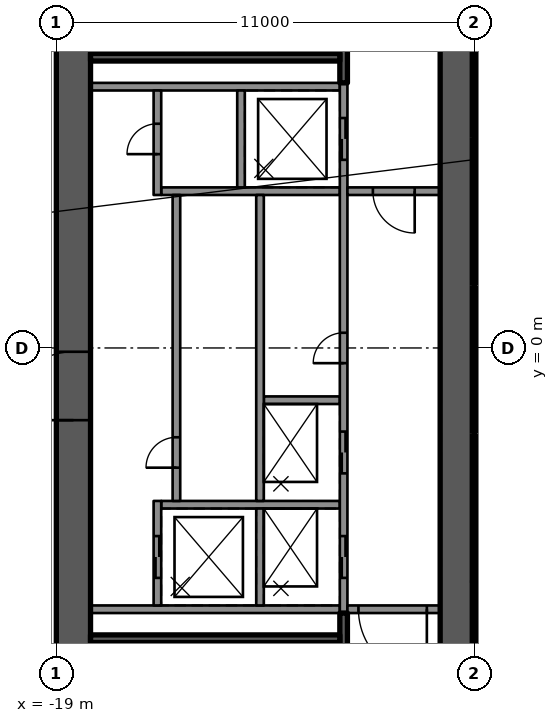
"""IFC4 building model, lengths in metres.
Left out: names, types, materials, properties, quantities, classifications, styles, units other than length and angle.
Written with IfcOpenShell. Run it as: python <this file> out.ifc"""

import sys

from ifc_helpers import new_model, si_unit, direction, frame, frame_2d, origin, place, context, subcontext, project, spatial, rectangle, extrude, element, fill, save


model = new_model("IFC4")
c1 = context("Model", 3, precision=1e-05, world=origin(), true_north=direction((0.0, 1.0)))
c2 = subcontext(c1, "Body", "Model", "MODEL_VIEW")
j1 = project(units=[si_unit("LENGTHUNIT", "METRE"), si_unit("PLANEANGLEUNIT", "RADIAN")], contexts=[c1])
p1 = place(None, origin())
s1 = spatial("IfcSite", under=j1, at=p1, CompositionType="ELEMENT")
p2 = place(p1, origin())
s2 = spatial("IfcBuilding", under=s1, at=p2, CompositionType="ELEMENT")
p3 = place(p2, frame((0.0, 0.0, 253.5)))
s3 = spatial("IfcBuildingStorey", under=s2, at=p3, CompositionType="ELEMENT", Elevation=253.5)
p4 = place(p3, frame((-18.55, -12.0, 0.0), z_axis=(0.0, 0.0, 1.0), x_axis=(0.0, 1.0, 0.0)))
e1 = element("IfcWall", 1, at=p4, inside=s3, PredefinedType="SHEAR", context=c2, shape_type="SweptSolid", body=[
    extrude(rectangle(XDim=24.0, YDim=0.9, at=frame_2d((12.0, 0.0))), origin(), (0.0, 0.0, 1.0), 3.5),
])
p5 = place(p4, frame((10.1, 0.0, 0.0)))
e2 = element("IfcOpeningElement", 2, at=p5, cuts=e1, PredefinedType="OPENING", context=c2, shape_type="SweptSolid", body=[
    extrude(rectangle(XDim=1.8, YDim=2.1, at=frame_2d((0.9, 1.05))), frame((0.0, 0.46, 0.0), z_axis=(0.0, -1.0, 0.0), x_axis=(1.0, 0.0, 0.0)), (0.0, 0.0, 1.0), 0.92),
])
p6 = place(p3, frame((-8.45, -12.0, 0.0), z_axis=(0.0, 0.0, 1.0), x_axis=(0.0, 1.0, 0.0)))
e3 = element("IfcWall", 3, at=p6, inside=s3, PredefinedType="SHEAR", context=c2, shape_type="SweptSolid", body=[
    extrude(rectangle(XDim=24.0, YDim=0.9, at=frame_2d((12.0, 0.0))), origin(), (0.0, 0.0, 1.0), 3.5),
])
for number, where, z_axis, x_axis in (
    (4, (-11.54, 6.875, 0.0), (0.0, 0.0, 1.0), (-1.0, 0.0, 0.0)),
    (5, (-11.54, -6.875, 0.0), (0.0, 0.0, 1.0), (-1.0, 0.0, 0.0)),
):
    element("IfcWall", number, at=place(p3, frame(where, z_axis=z_axis, x_axis=x_axis)), inside=s3, PredefinedType="SOLIDWALL", context=c2, shape_type="SweptSolid", body=[
        extrude(rectangle(XDim=6.56, YDim=0.2, at=frame_2d((3.28, 0.0))), origin(), (0.0, 0.0, 1.0), 3.09),
    ])
p7 = place(p3, frame((-11.54, -4.125, 0.0), z_axis=(0.0, 0.0, 1.0), x_axis=(-1.0, 0.0, 0.0)))
e6 = element("IfcWall", 6, at=p7, inside=s3, PredefinedType="SOLIDWALL", context=c2, shape_type="SweptSolid", body=[
    extrude(rectangle(XDim=4.7, YDim=0.2, at=frame_2d((2.35, 0.0))), origin(), (0.0, 0.0, 1.0), 3.09),
])
p8 = place(p3, frame((-11.54, -1.375, 0.0), z_axis=(0.0, 0.0, 1.0), x_axis=(-1.0, 0.0, 0.0)))
e7 = element("IfcWall", 7, at=p8, inside=s3, PredefinedType="SOLIDWALL", context=c2, shape_type="SweptSolid", body=[
    extrude(rectangle(XDim=2.0, YDim=0.2, at=frame_2d((1.0, 0.0))), origin(), (0.0, 0.0, 1.0), 3.09),
])
p9 = place(p3, frame((-11.54, 4.125, 0.0), z_axis=(0.0, 0.0, 1.0), x_axis=(-1.0, 0.0, 0.0)))
e8 = element("IfcWall", 8, at=p9, inside=s3, PredefinedType="SOLIDWALL", context=c2, shape_type="SweptSolid", body=[
    extrude(rectangle(XDim=4.7, YDim=0.2, at=frame_2d((2.35, 0.0))), origin(), (0.0, 0.0, 1.0), 3.09),
])
p10 = place(p3, frame((-11.44, -6.975, 0.0), z_axis=(0.0, 0.0, 1.0), x_axis=(0.0, 1.0, 0.0)))
e9 = element("IfcWall", 9, at=p10, inside=s3, PredefinedType="SOLIDWALL", context=c2, shape_type="SweptSolid", body=[
    extrude(rectangle(XDim=13.95, YDim=0.2, at=frame_2d((6.975, 0.0))), origin(), (0.0, 0.0, 1.0), 3.09),
])
p11 = place(p10, frame((0.925, 0.0, 0.0)))
e10 = element("IfcOpeningElement", 10, at=p11, cuts=e9, PredefinedType="OPENING", context=c2, shape_type="SweptSolid", body=[
    extrude(rectangle(XDim=1.1, YDim=2.1, at=frame_2d((0.55, 1.05))), frame((0.0, 0.11, 0.0), z_axis=(0.0, -1.0, 0.0), x_axis=(1.0, 0.0, 0.0)), (0.0, 0.0, 1.0), 0.22),
])
p12 = place(p10, frame((3.675, 0.0, 0.0)))
e11 = element("IfcOpeningElement", 11, at=p12, cuts=e9, PredefinedType="OPENING", context=c2, shape_type="SweptSolid", body=[
    extrude(rectangle(XDim=1.1, YDim=2.1, at=frame_2d((0.55, 1.05))), frame((0.0, 0.11, 0.0), z_axis=(0.0, -1.0, 0.0), x_axis=(1.0, 0.0, 0.0)), (0.0, 0.0, 1.0), 0.22),
])
p13 = place(p10, frame((11.925, 0.0, 0.0)))
e12 = element("IfcOpeningElement", 12, at=p13, cuts=e9, PredefinedType="OPENING", context=c2, shape_type="SweptSolid", body=[
    extrude(rectangle(XDim=1.1, YDim=2.1, at=frame_2d((0.55, 1.05))), frame((0.0, 0.11, 0.0), z_axis=(0.0, -1.0, 0.0), x_axis=(1.0, 0.0, 0.0)), (0.0, 0.0, 1.0), 0.22),
])
p14 = place(p10, frame((6.575, 0.0, 0.0)))
e13 = element("IfcOpeningElement", 13, at=p14, cuts=e9, PredefinedType="OPENING", context=c2, shape_type="SweptSolid", body=[
    extrude(rectangle(XDim=0.8, YDim=2.1, at=frame_2d((0.4, 1.05))), frame((0.0, 0.11, 0.0), z_axis=(0.0, -1.0, 0.0), x_axis=(1.0, 0.0, 0.0)), (0.0, 0.0, 1.0), 0.22),
])
p15 = place(p3, frame((-13.64, -6.775, 0.0), z_axis=(0.0, 0.0, 1.0), x_axis=(0.0, 1.0, 0.0)))
e14 = element("IfcWall", 14, at=p15, inside=s3, PredefinedType="SOLIDWALL", context=c2, shape_type="SweptSolid", body=[
    extrude(rectangle(XDim=2.55, YDim=0.2, at=frame_2d((1.275, 0.0))), origin(), (0.0, 0.0, 1.0), 3.09),
])
p16 = place(p3, frame((-13.64, -4.025, 0.0), z_axis=(0.0, 0.0, 1.0), x_axis=(0.0, 1.0, 0.0)))
e15 = element("IfcWall", 15, at=p16, inside=s3, PredefinedType="SOLIDWALL", context=c2, shape_type="SweptSolid", body=[
    extrude(rectangle(XDim=8.05, YDim=0.2, at=frame_2d((4.025, 0.0))), origin(), (0.0, 0.0, 1.0), 3.09),
])
p17 = place(p3, frame((-14.14, 4.225, 0.0), z_axis=(0.0, 0.0, 1.0), x_axis=(0.0, 1.0, 0.0)))
e16 = element("IfcWall", 16, at=p17, inside=s3, PredefinedType="SOLIDWALL", context=c2, shape_type="SweptSolid", body=[
    extrude(rectangle(XDim=2.55, YDim=0.2, at=frame_2d((1.275, 0.0))), origin(), (0.0, 0.0, 1.0), 3.09),
])
p18 = place(p3, frame((-16.34, -6.775, 0.0), z_axis=(0.0, 0.0, 1.0), x_axis=(0.0, 1.0, 0.0)))
e17 = element("IfcWall", 17, at=p18, inside=s3, PredefinedType="SOLIDWALL", context=c2, shape_type="SweptSolid", body=[
    extrude(rectangle(XDim=2.75, YDim=0.2, at=frame_2d((1.375, 0.0))), origin(), (0.0, 0.0, 1.0), 3.09),
])
p19 = place(p18, frame((0.725, 0.0, 0.0)))
e18 = element("IfcOpeningElement", 18, at=p19, cuts=e17, PredefinedType="OPENING", context=c2, shape_type="SweptSolid", body=[
    extrude(rectangle(XDim=1.1, YDim=2.1, at=frame_2d((0.55, 1.05))), frame((0.0, 0.11, 0.0), z_axis=(0.0, -1.0, 0.0), x_axis=(1.0, 0.0, 0.0)), (0.0, 0.0, 1.0), 0.22),
])
p20 = place(p3, frame((-15.84, -4.025, 0.0), z_axis=(0.0, 0.0, 1.0), x_axis=(0.0, 1.0, 0.0)))
e19 = element("IfcWall", 19, at=p20, inside=s3, PredefinedType="SOLIDWALL", context=c2, shape_type="SweptSolid", body=[
    extrude(rectangle(XDim=8.05, YDim=0.2, at=frame_2d((4.025, 0.0))), origin(), (0.0, 0.0, 1.0), 3.09),
])
p21 = place(p20, frame((0.875, 0.0, 0.0)))
e20 = element("IfcOpeningElement", 20, at=p21, cuts=e19, PredefinedType="OPENING", context=c2, shape_type="SweptSolid", body=[
    extrude(rectangle(XDim=0.8, YDim=2.1, at=frame_2d((0.4, 1.05))), frame((0.0, 0.11, 0.0), z_axis=(0.0, -1.0, 0.0), x_axis=(1.0, 0.0, 0.0)), (0.0, 0.0, 1.0), 0.22),
])
p22 = place(p3, frame((-16.34, 4.025, 0.0), z_axis=(0.0, 0.0, 1.0), x_axis=(0.0, 1.0, 0.0)))
e21 = element("IfcWall", 21, at=p22, inside=s3, PredefinedType="SOLIDWALL", context=c2, shape_type="SweptSolid", body=[
    extrude(rectangle(XDim=2.75, YDim=0.2, at=frame_2d((1.375, 0.0))), origin(), (0.0, 0.0, 1.0), 3.09),
])
p23 = place(p22, frame((1.075, 0.0, 0.0)))
e22 = element("IfcOpeningElement", 22, at=p23, cuts=e21, PredefinedType="OPENING", context=c2, shape_type="SweptSolid", body=[
    extrude(rectangle(XDim=0.8, YDim=2.1, at=frame_2d((0.4, 1.05))), frame((0.0, 0.11, 0.0), z_axis=(0.0, -1.0, 0.0), x_axis=(1.0, 0.0, 0.0)), (0.0, 0.0, 1.0), 0.22),
])
p24 = place(p3, frame((-11.44, 6.975, 0.0), z_axis=(0.0, 0.0, 1.0), x_axis=(0.0, 1.0, 0.0)))
e23 = element("IfcWall", 23, at=p24, inside=s3, PredefinedType="SOLIDWALL", context=c2, shape_type="SweptSolid", body=[
    extrude(rectangle(XDim=4.125, YDim=0.2, at=frame_2d((2.062, 0.0))), origin(), (0.0, 0.0, 1.0), 3.09),
])
p25 = place(p24, frame((2.1, 0.0, 0.0)))
e24 = element("IfcOpeningElement", 24, at=p25, cuts=e23, PredefinedType="OPENING", context=c2, shape_type="SweptSolid", body=[
    extrude(rectangle(XDim=1.1, YDim=2.1, at=frame_2d((0.55, 1.05))), frame((0.0, 0.11, 0.0), z_axis=(0.0, -1.0, 0.0), x_axis=(1.0, 0.0, 0.0)), (0.0, 0.0, 1.0), 0.22),
])
p26 = place(p3, frame((-11.54, 7.65, 0.0), z_axis=(0.0, 0.0, 1.0), x_axis=(-1.0, 0.0, 0.0)))
e25 = element("IfcWall", 25, at=p26, inside=s3, PredefinedType="SOLIDWALL", context=c2, shape_type="SweptSolid", body=[
    extrude(rectangle(XDim=6.56, YDim=0.2, at=frame_2d((3.28, 0.0))), origin(), (0.0, 0.0, 1.0), 3.09),
])
p27 = place(p3, frame((-11.44, -11.1, 0.0), z_axis=(0.0, 0.0, 1.0), x_axis=(0.0, 1.0, 0.0)))
e26 = element("IfcWall", 26, at=p27, inside=s3, PredefinedType="SOLIDWALL", context=c2, shape_type="SweptSolid", body=[
    extrude(rectangle(XDim=4.125, YDim=0.2, at=frame_2d((2.062, 0.0))), origin(), (0.0, 0.0, 1.0), 3.09),
])
p28 = place(p3, frame((-11.54, -7.65, 0.0), z_axis=(0.0, 0.0, 1.0), x_axis=(-1.0, 0.0, 0.0)))
e27 = element("IfcWall", 27, at=p28, inside=s3, PredefinedType="SOLIDWALL", context=c2, shape_type="SweptSolid", body=[
    extrude(rectangle(XDim=6.56, YDim=0.2, at=frame_2d((3.28, 0.0))), origin(), (0.0, 0.0, 1.0), 3.09),
])
p29 = place(p3, frame((-8.9, 4.125, 0.0), z_axis=(0.0, 0.0, 1.0), x_axis=(-1.0, 0.0, 0.0)))
e28 = element("IfcWall", 28, at=p29, inside=s3, PredefinedType="PARTITIONING", context=c2, shape_type="SweptSolid", body=[
    extrude(rectangle(XDim=2.44, YDim=0.2, at=frame_2d((1.22, 0.0))), origin(), (0.0, 0.0, 1.0), 3.09),
])
p30 = place(p29, frame((0.67, 0.0, 0.0)))
e29 = element("IfcOpeningElement", 29, at=p30, cuts=e28, PredefinedType="OPENING", context=c2, shape_type="SweptSolid", body=[
    extrude(rectangle(XDim=1.1, YDim=2.1, at=frame_2d((0.55, 1.05))), frame((0.0, 0.11, 0.0), z_axis=(0.0, -1.0, 0.0), x_axis=(1.0, 0.0, 0.0)), (0.0, 0.0, 1.0), 0.22),
])
p31 = place(p3, frame((-8.9, -6.875, 0.0), z_axis=(0.0, 0.0, 1.0), x_axis=(-1.0, 0.0, 0.0)))
e30 = element("IfcWall", 30, at=p31, inside=s3, PredefinedType="PARTITIONING", context=c2, shape_type="SweptSolid", body=[
    extrude(rectangle(XDim=2.44, YDim=0.2, at=frame_2d((1.22, 0.0))), origin(), (0.0, 0.0, 1.0), 3.09),
])
p32 = place(p31, frame((0.35, 0.0, 0.0)))
e31 = element("IfcOpeningElement", 31, at=p32, cuts=e30, PredefinedType="OPENING", context=c2, shape_type="SweptSolid", body=[
    extrude(rectangle(XDim=1.8, YDim=2.1, at=frame_2d((0.9, 1.05))), frame((0.0, 0.11, 0.0), z_axis=(0.0, -1.0, 0.0), x_axis=(1.0, 0.0, 0.0)), (0.0, 0.0, 1.0), 0.22),
])
p33 = place(p11, origin())
e32 = element("IfcDoor", 32, at=p33, inside=s3, OperationType="DOUBLE_DOOR_SLIDING", PredefinedType="DOOR", context=c2, shape_type="SweptSolid", body=[
    extrude(rectangle(XDim=1.1, YDim=2.1, at=frame_2d((0.55, 1.05))), frame((0.0, 0.025, 0.0), z_axis=(0.0, -1.0, 0.0), x_axis=(1.0, 0.0, 0.0)), (0.0, 0.0, 1.0), 0.05),
])
fill(e10, e32)
p34 = place(p19, origin())
e33 = element("IfcDoor", 33, at=p34, inside=s3, OperationType="DOUBLE_DOOR_SLIDING", PredefinedType="DOOR", context=c2, shape_type="SweptSolid", body=[
    extrude(rectangle(XDim=1.1, YDim=2.1, at=frame_2d((0.55, 1.05))), frame((0.0, 0.025, 0.0), z_axis=(0.0, -1.0, 0.0), x_axis=(1.0, 0.0, 0.0)), (0.0, 0.0, 1.0), 0.05),
])
fill(e18, e33)
p35 = place(p12, origin())
e34 = element("IfcDoor", 34, at=p35, inside=s3, OperationType="DOUBLE_DOOR_SLIDING", PredefinedType="DOOR", context=c2, shape_type="SweptSolid", body=[
    extrude(rectangle(XDim=1.1, YDim=2.1, at=frame_2d((0.55, 1.05))), frame((0.0, 0.025, 0.0), z_axis=(0.0, -1.0, 0.0), x_axis=(1.0, 0.0, 0.0)), (0.0, 0.0, 1.0), 0.05),
])
fill(e11, e34)
p36 = place(p13, origin())
e35 = element("IfcDoor", 35, at=p36, inside=s3, OperationType="DOUBLE_DOOR_SLIDING", PredefinedType="DOOR", context=c2, shape_type="SweptSolid", body=[
    extrude(rectangle(XDim=1.1, YDim=2.1, at=frame_2d((0.55, 1.05))), frame((0.0, 0.025, 0.0), z_axis=(0.0, -1.0, 0.0), x_axis=(1.0, 0.0, 0.0)), (0.0, 0.0, 1.0), 0.05),
])
fill(e12, e35)
p37 = place(p21, origin())
e36 = element("IfcDoor", 36, at=p37, inside=s3, OperationType="SINGLE_SWING_LEFT", PredefinedType="DOOR", context=c2, shape_type="SweptSolid", body=[
    extrude(rectangle(XDim=0.8, YDim=2.1, at=frame_2d((0.4, 1.05))), frame((0.0, 0.025, 0.0), z_axis=(0.0, -1.0, 0.0), x_axis=(1.0, 0.0, 0.0)), (0.0, 0.0, 1.0), 0.05),
])
fill(e20, e36)
p38 = place(p14, origin())
e37 = element("IfcDoor", 37, at=p38, inside=s3, OperationType="SINGLE_SWING_LEFT", PredefinedType="DOOR", context=c2, shape_type="SweptSolid", body=[
    extrude(rectangle(XDim=0.8, YDim=2.1, at=frame_2d((0.4, 1.05))), frame((0.0, 0.025, 0.0), z_axis=(0.0, -1.0, 0.0), x_axis=(1.0, 0.0, 0.0)), (0.0, 0.0, 1.0), 0.05),
])
fill(e13, e37)
p39 = place(p23, origin())
e38 = element("IfcDoor", 38, at=p39, inside=s3, OperationType="SINGLE_SWING_LEFT", PredefinedType="DOOR", context=c2, shape_type="SweptSolid", body=[
    extrude(rectangle(XDim=0.8, YDim=2.1, at=frame_2d((0.4, 1.05))), frame((0.0, 0.025, 0.0), z_axis=(0.0, -1.0, 0.0), x_axis=(1.0, 0.0, 0.0)), (0.0, 0.0, 1.0), 0.05),
])
fill(e22, e38)
p40 = place(p5, origin())
e39 = element("IfcDoor", 39, at=p40, inside=s3, OperationType="SINGLE_SWING_LEFT", PredefinedType="DOOR", context=c2, shape_type="SweptSolid", body=[
    extrude(rectangle(XDim=1.8, YDim=2.1, at=frame_2d((0.9, 1.05))), frame((0.0, 0.025, 0.0), z_axis=(0.0, -1.0, 0.0), x_axis=(1.0, 0.0, 0.0)), (0.0, 0.0, 1.0), 0.05),
])
fill(e2, e39)
p41 = place(p30, origin())
e40 = element("IfcDoor", 40, at=p41, inside=s3, OperationType="SINGLE_SWING_RIGHT", PredefinedType="DOOR", context=c2, shape_type="SweptSolid", body=[
    extrude(rectangle(XDim=1.1, YDim=2.1, at=frame_2d((0.55, 1.05))), frame((0.0, 0.025, 0.0), z_axis=(0.0, -1.0, 0.0), x_axis=(1.0, 0.0, 0.0)), (0.0, 0.0, 1.0), 0.05),
])
fill(e29, e40)
p42 = place(p32, origin())
e41 = element("IfcDoor", 41, at=p42, inside=s3, OperationType="DOUBLE_DOOR_DOUBLE_SWING", PredefinedType="DOOR", context=c2, shape_type="SweptSolid", body=[
    extrude(rectangle(XDim=1.8, YDim=2.1, at=frame_2d((0.9, 1.05))), frame((0.0, 0.025, 0.0), z_axis=(0.0, -1.0, 0.0), x_axis=(1.0, 0.0, 0.0)), (0.0, 0.0, 1.0), 0.05),
])
fill(e31, e41)
save(model, sys.argv[1])
